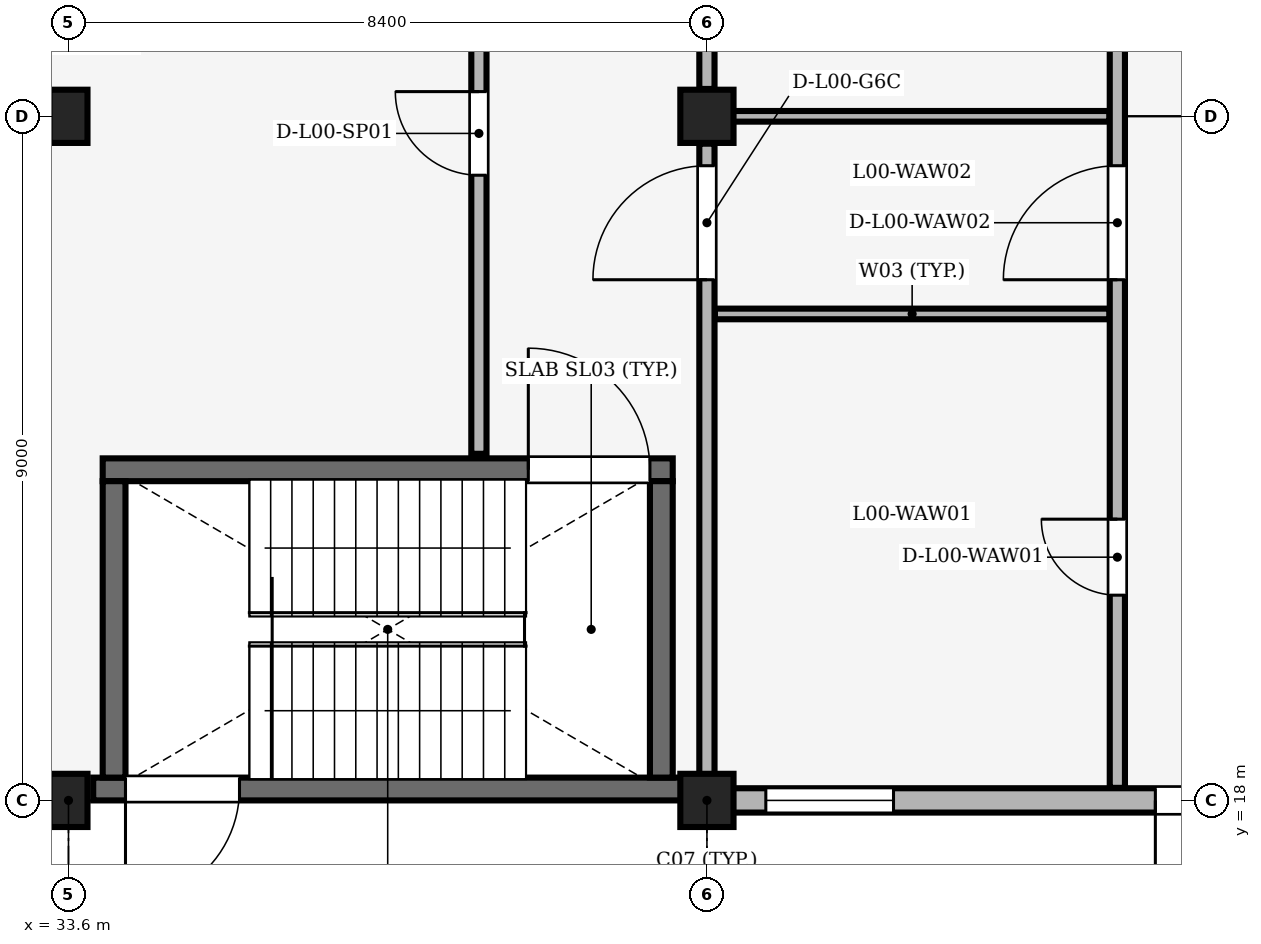
"""IFC4 building model, lengths in metres.
Left out: names, types, materials, properties, quantities, classifications, styles, units other than length and angle.
Written with IfcOpenShell. Run it as: python <this file> out.ifc"""

import sys

from ifc_helpers import new_model, si_unit, direction, frame, frame_2d, origin, origin_2d, place, context, subcontext, project, spatial, rectangle, extrude, element, fill, save


model = new_model("IFC4")
c1 = context("Model", 3, precision=1e-05, world=origin(), true_north=direction((0.0, 1.0)))
c2 = subcontext(c1, "Body", "Model", "MODEL_VIEW")
j1 = project(units=[si_unit("LENGTHUNIT", "METRE"), si_unit("PLANEANGLEUNIT", "RADIAN")], contexts=[c1])
p1 = place(None, origin())
s1 = spatial("IfcSite", under=j1, at=p1, CompositionType="ELEMENT")
p2 = place(p1, origin())
s2 = spatial("IfcBuilding", under=s1, at=p2, CompositionType="ELEMENT")
p3 = place(p2, origin())
s3 = spatial("IfcBuildingStorey", under=s2, at=p3, CompositionType="ELEMENT", Elevation=0.0)
for number, where, z_axis, x_axis in (
    (1, (33.6, 18.0, 0.0), (0.0, 0.0, 1.0), (1.0, 0.0, 0.0)),
    (2, (33.6, 27.0, 0.0), (0.0, 0.0, 1.0), (1.0, 0.0, 0.0)),
):
    element("IfcColumn", number, at=place(p3, frame(where, z_axis=z_axis, x_axis=x_axis)), inside=s3, PredefinedType="COLUMN", context=c2, shape_type="SweptSolid", body=[
        extrude(rectangle(XDim=0.5, YDim=0.7, at=origin_2d()), origin(), (0.0, 0.0, 1.0), 4.8),
    ])
for number, where, z_axis, x_axis in (
    (3, (42.0, 18.0, 0.0), (0.0, 0.0, 1.0), (1.0, 0.0, 0.0)),
    (4, (42.0, 27.0, 0.0), (0.0, 0.0, 1.0), (1.0, 0.0, 0.0)),
):
    element("IfcColumn", number, at=place(p3, frame(where, z_axis=z_axis, x_axis=x_axis)), inside=s3, PredefinedType="COLUMN", context=c2, shape_type="SweptSolid", body=[
        extrude(rectangle(XDim=0.7, YDim=0.7, at=origin_2d()), origin(), (0.0, 0.0, 1.0), 4.8),
    ])
p4 = place(p3, frame((42.325, 18.0, 0.0), z_axis=(0.0, 0.0, 1.0), x_axis=(1.0, 0.0, 0.0)))
e5 = element("IfcWall", 5, at=p4, inside=s3, PredefinedType="SOLIDWALL", context=c2, shape_type="SweptSolid", body=[
    extrude(rectangle(XDim=7.75, YDim=0.32, at=frame_2d((3.875, 0.0))), origin(), (0.0, 0.0, 1.0), 3.73),
])
p5 = place(p4, frame((7.375, 0.0, 0.0), z_axis=(0.0, 0.0, 1.0), x_axis=(-1.0, 0.0, 0.0)))
e6 = element("IfcOpeningElement", 6, at=p5, cuts=e5, PredefinedType="OPENING", context=c2, shape_type="SweptSolid", body=[
    extrude(rectangle(XDim=1.8, YDim=2.35, at=frame_2d((0.9, 1.175))), frame((0.0, 0.17, 0.0), z_axis=(0.0, -1.0, 0.0), x_axis=(1.0, 0.0, 0.0)), (0.0, 0.0, 1.0), 0.34),
])
p6 = place(p4, frame((0.45, 0.0, 0.95)))
e7 = element("IfcOpeningElement", 7, at=p6, cuts=e5, PredefinedType="OPENING", context=c2, shape_type="SweptSolid", body=[
    extrude(rectangle(XDim=1.68, YDim=1.8, at=frame_2d((0.84, 0.9))), frame((0.0, 0.17, 0.0), z_axis=(0.0, -1.0, 0.0), x_axis=(1.0, 0.0, 0.0)), (0.0, 0.0, 1.0), 0.34),
])
p7 = place(p3, frame((33.925, 18.15, 0.0), z_axis=(0.0, 0.0, 1.0), x_axis=(1.0, 0.0, 0.0)))
e8 = element("IfcWall", 8, at=p7, inside=s3, PredefinedType="SHEAR", context=c2, shape_type="SweptSolid", body=[
    extrude(rectangle(XDim=7.75, YDim=0.3, at=frame_2d((3.875, 0.0))), origin(), (0.0, 0.0, 1.0), 4.625),
])
p8 = place(p7, frame((1.925, 0.0, 0.0), z_axis=(0.0, 0.0, 1.0), x_axis=(-1.0, 0.0, 0.0)))
e9 = element("IfcOpeningElement", 9, at=p8, cuts=e8, PredefinedType="OPENING", context=c2, shape_type="SweptSolid", body=[
    extrude(rectangle(XDim=1.5, YDim=2.2, at=frame_2d((0.75, 1.1))), frame((0.0, 0.16, 0.0), z_axis=(0.0, -1.0, 0.0), x_axis=(1.0, 0.0, 0.0)), (0.0, 0.0, 1.0), 0.32),
])
p9 = place(p3, frame((34.05, 22.35, 0.0), z_axis=(0.0, 0.0, 1.0), x_axis=(1.0, 0.0, 0.0)))
e10 = element("IfcWall", 10, at=p9, inside=s3, PredefinedType="SHEAR", context=c2, shape_type="SweptSolid", body=[
    extrude(rectangle(XDim=7.5, YDim=0.3, at=frame_2d((3.75, 0.0))), origin(), (0.0, 0.0, 1.0), 4.625),
])
p10 = place(p9, frame((5.6, 0.0, 0.0)))
e11 = element("IfcOpeningElement", 11, at=p10, cuts=e10, PredefinedType="OPENING", context=c2, shape_type="SweptSolid", body=[
    extrude(rectangle(XDim=1.6, YDim=2.2, at=frame_2d((0.8, 1.1))), frame((0.0, 0.16, 0.0), z_axis=(0.0, -1.0, 0.0), x_axis=(1.0, 0.0, 0.0)), (0.0, 0.0, 1.0), 0.32),
])
for number, where, z_axis, x_axis in (
    (12, (34.2, 18.3, 0.0), (0.0, 0.0, 1.0), (0.0, 1.0, 0.0)),
    (13, (41.4, 18.3, 0.0), (0.0, 0.0, 1.0), (0.0, 1.0, 0.0)),
):
    element("IfcWall", number, at=place(p3, frame(where, z_axis=z_axis, x_axis=x_axis)), inside=s3, PredefinedType="SHEAR", context=c2, shape_type="SweptSolid", body=[
        extrude(rectangle(XDim=3.9, YDim=0.3, at=frame_2d((1.95, 0.0))), origin(), (0.0, 0.0, 1.0), 4.625),
    ])
p11 = place(p3, frame((39.0, 22.56, 0.0), z_axis=(0.0, 0.0, 1.0), x_axis=(0.0, 1.0, 0.0)))
e14 = element("IfcWall", 14, at=p11, inside=s3, PredefinedType="PARTITIONING", context=c2, shape_type="SweptSolid", body=[
    extrude(rectangle(XDim=29.535, YDim=0.2, at=frame_2d((14.768, 0.0))), origin(), (0.0, 0.0, 1.0), 4.5),
])
p12 = place(p11, frame((3.665, 0.0, 0.0)))
e15 = element("IfcOpeningElement", 15, at=p12, cuts=e14, PredefinedType="OPENING", context=c2, shape_type="SweptSolid", body=[
    extrude(rectangle(XDim=1.1, YDim=2.15, at=frame_2d((0.55, 1.075))), frame((0.0, 0.11, 0.0), z_axis=(0.0, -1.0, 0.0), x_axis=(1.0, 0.0, 0.0)), (0.0, 0.0, 1.0), 0.22),
])
p13 = place(p11, frame((12.19, 0.0, 0.0)))
e16 = element("IfcOpeningElement", 16, at=p13, cuts=e14, PredefinedType="OPENING", context=c2, shape_type="SweptSolid", body=[
    extrude(rectangle(XDim=1.1, YDim=2.15, at=frame_2d((0.55, 1.075))), frame((0.0, 0.11, 0.0), z_axis=(0.0, -1.0, 0.0), x_axis=(1.0, 0.0, 0.0)), (0.0, 0.0, 1.0), 0.22),
])
p14 = place(p11, frame((20.04, 0.0, 0.0)))
e17 = element("IfcOpeningElement", 17, at=p14, cuts=e14, PredefinedType="OPENING", context=c2, shape_type="SweptSolid", body=[
    extrude(rectangle(XDim=1.2, YDim=2.2, at=frame_2d((0.6, 1.1))), frame((0.0, 0.11, 0.0), z_axis=(0.0, -1.0, 0.0), x_axis=(1.0, 0.0, 0.0)), (0.0, 0.0, 1.0), 0.22),
])
p15 = place(p11, frame((26.39, 0.0, 0.0)))
e18 = element("IfcOpeningElement", 18, at=p15, cuts=e14, PredefinedType="OPENING", context=c2, shape_type="SweptSolid", body=[
    extrude(rectangle(XDim=1.1, YDim=2.15, at=frame_2d((0.55, 1.075))), frame((0.0, 0.11, 0.0), z_axis=(0.0, -1.0, 0.0), x_axis=(1.0, 0.0, 0.0)), (0.0, 0.0, 1.0), 0.22),
])
p16 = place(p3, frame((42.105, 24.4, 0.0), z_axis=(0.0, 0.0, 1.0), x_axis=(1.0, 0.0, 0.0)))
e19 = element("IfcWall", 19, at=p16, inside=s3, PredefinedType="PARTITIONING", context=c2, shape_type="SweptSolid", body=[
    extrude(rectangle(XDim=5.19, YDim=0.14, at=frame_2d((2.595, 0.0))), origin(), (0.0, 0.0, 1.0), 4.03),
])
p17 = place(p3, frame((42.105, 27.0, 0.0), z_axis=(0.0, 0.0, 1.0), x_axis=(1.0, 0.0, 0.0)))
e20 = element("IfcWall", 20, at=p17, inside=s3, PredefinedType="PARTITIONING", context=c2, shape_type="SweptSolid", body=[
    extrude(rectangle(XDim=5.19, YDim=0.14, at=frame_2d((2.595, 0.0))), origin(), (0.0, 0.0, 1.0), 3.83),
])
p18 = place(p3, frame((47.4, 18.165, 0.0), z_axis=(0.0, 0.0, 1.0), x_axis=(0.0, 1.0, 0.0)))
e21 = element("IfcWall", 21, at=p18, inside=s3, PredefinedType="PARTITIONING", context=c2, shape_type="SweptSolid", body=[
    extrude(rectangle(XDim=67.625, YDim=0.2, at=frame_2d((33.812, 0.0))), origin(), (0.0, 0.0, 1.0), 4.5),
])
p19 = place(p18, frame((2.535, 0.0, 0.0)))
e22 = element("IfcOpeningElement", 22, at=p19, cuts=e21, PredefinedType="OPENING", context=c2, shape_type="SweptSolid", body=[
    extrude(rectangle(XDim=1.0, YDim=2.25, at=frame_2d((0.5, 1.125))), frame((0.0, 0.11, 0.0), z_axis=(0.0, -1.0, 0.0), x_axis=(1.0, 0.0, 0.0)), (0.0, 0.0, 1.0), 0.22),
])
p20 = place(p18, frame((6.685, 0.0, 0.0)))
e23 = element("IfcOpeningElement", 23, at=p20, cuts=e21, PredefinedType="OPENING", context=c2, shape_type="SweptSolid", body=[
    extrude(rectangle(XDim=1.5, YDim=2.2, at=frame_2d((0.75, 1.1))), frame((0.0, 0.11, 0.0), z_axis=(0.0, -1.0, 0.0), x_axis=(1.0, 0.0, 0.0)), (0.0, 0.0, 1.0), 0.22),
])
p21 = place(p18, frame((12.535, 0.0, 0.0)))
e24 = element("IfcOpeningElement", 24, at=p21, cuts=e21, PredefinedType="OPENING", context=c2, shape_type="SweptSolid", body=[
    extrude(rectangle(XDim=1.0, YDim=2.15, at=frame_2d((0.5, 1.075))), frame((0.0, 0.11, 0.0), z_axis=(0.0, -1.0, 0.0), x_axis=(1.0, 0.0, 0.0)), (0.0, 0.0, 1.0), 0.22),
])
p22 = place(p18, frame((20.935, 0.0, 0.0)))
e25 = element("IfcOpeningElement", 25, at=p22, cuts=e21, PredefinedType="OPENING", context=c2, shape_type="SweptSolid", body=[
    extrude(rectangle(XDim=1.0, YDim=2.15, at=frame_2d((0.5, 1.075))), frame((0.0, 0.11, 0.0), z_axis=(0.0, -1.0, 0.0), x_axis=(1.0, 0.0, 0.0)), (0.0, 0.0, 1.0), 0.22),
])
p23 = place(p18, frame((29.36, 0.0, 0.0)))
e26 = element("IfcOpeningElement", 26, at=p23, cuts=e21, PredefinedType="OPENING", context=c2, shape_type="SweptSolid", body=[
    extrude(rectangle(XDim=0.95, YDim=2.2, at=frame_2d((0.475, 1.1))), frame((0.0, 0.11, 0.0), z_axis=(0.0, -1.0, 0.0), x_axis=(1.0, 0.0, 0.0)), (0.0, 0.0, 1.0), 0.22),
])
p24 = place(p18, frame((36.26, 0.0, 0.0)))
e27 = element("IfcOpeningElement", 27, at=p24, cuts=e21, PredefinedType="OPENING", context=c2, shape_type="SweptSolid", body=[
    extrude(rectangle(XDim=0.95, YDim=2.2, at=frame_2d((0.475, 1.1))), frame((0.0, 0.11, 0.0), z_axis=(0.0, -1.0, 0.0), x_axis=(1.0, 0.0, 0.0)), (0.0, 0.0, 1.0), 0.22),
])
p25 = place(p18, frame((41.06, 0.0, 0.0)))
e28 = element("IfcOpeningElement", 28, at=p25, cuts=e21, PredefinedType="OPENING", context=c2, shape_type="SweptSolid", body=[
    extrude(rectangle(XDim=0.95, YDim=2.1, at=frame_2d((0.475, 1.05))), frame((0.0, 0.11, 0.0), z_axis=(0.0, -1.0, 0.0), x_axis=(1.0, 0.0, 0.0)), (0.0, 0.0, 1.0), 0.22),
])
p26 = place(p18, frame((49.635, 0.0, 0.0)))
e29 = element("IfcOpeningElement", 29, at=p26, cuts=e21, PredefinedType="OPENING", context=c2, shape_type="SweptSolid", body=[
    extrude(rectangle(XDim=1.2, YDim=2.2, at=frame_2d((0.6, 1.1))), frame((0.0, 0.11, 0.0), z_axis=(0.0, -1.0, 0.0), x_axis=(1.0, 0.0, 0.0)), (0.0, 0.0, 1.0), 0.22),
])
p27 = place(p18, frame((61.735, 0.0, 0.0)))
e30 = element("IfcOpeningElement", 30, at=p27, cuts=e21, PredefinedType="OPENING", context=c2, shape_type="SweptSolid", body=[
    extrude(rectangle(XDim=1.0, YDim=2.25, at=frame_2d((0.5, 1.125))), frame((0.0, 0.11, 0.0), z_axis=(0.0, -1.0, 0.0), x_axis=(1.0, 0.0, 0.0)), (0.0, 0.0, 1.0), 0.22),
])
p28 = place(p3, frame((42.0, 18.165, 0.0), z_axis=(0.0, 0.0, 1.0), x_axis=(0.0, 1.0, 0.0)))
e31 = element("IfcWall", 31, at=p28, inside=s3, PredefinedType="PARTITIONING", context=c2, shape_type="SweptSolid", body=[
    extrude(rectangle(XDim=8.475, YDim=0.2, at=frame_2d((4.237, 0.0))), origin(), (0.0, 0.0, 1.0), 3.872),
])
p29 = place(p28, frame((6.685, 0.0, 0.0)))
e32 = element("IfcOpeningElement", 32, at=p29, cuts=e31, PredefinedType="OPENING", context=c2, shape_type="SweptSolid", body=[
    extrude(rectangle(XDim=1.5, YDim=2.2, at=frame_2d((0.75, 1.1))), frame((0.0, 0.11, 0.0), z_axis=(0.0, -1.0, 0.0), x_axis=(1.0, 0.0, 0.0)), (0.0, 0.0, 1.0), 0.22),
])
p30 = place(p3, frame((42.0, 27.36, 0.0), z_axis=(0.0, 0.0, 1.0), x_axis=(0.0, 1.0, 0.0)))
e33 = element("IfcWall", 33, at=p30, inside=s3, PredefinedType="PARTITIONING", context=c2, shape_type="SweptSolid", body=[
    extrude(rectangle(XDim=7.68, YDim=0.2, at=frame_2d((3.84, 0.0))), origin(), (0.0, 0.0, 1.0), 3.912),
])
p31 = place(p30, frame((3.34, 0.0, 0.0)))
e34 = element("IfcOpeningElement", 34, at=p31, cuts=e33, PredefinedType="OPENING", context=c2, shape_type="SweptSolid", body=[
    extrude(rectangle(XDim=1.0, YDim=2.15, at=frame_2d((0.5, 1.075))), frame((0.0, 0.11, 0.0), z_axis=(0.0, -1.0, 0.0), x_axis=(1.0, 0.0, 0.0)), (0.0, 0.0, 1.0), 0.22),
])
p32 = place(p5, origin())
e35 = element("IfcDoor", 35, at=p32, inside=s3, OperationType="DOUBLE_DOOR_SINGLE_SWING", PredefinedType="DOOR", context=c2, shape_type="SweptSolid", body=[
    extrude(rectangle(XDim=1.8, YDim=2.35, at=frame_2d((0.9, 1.175))), frame((0.0, 0.025, 0.0), z_axis=(0.0, -1.0, 0.0), x_axis=(1.0, 0.0, 0.0)), (0.0, 0.0, 1.0), 0.05),
])
fill(e6, e35)
p33 = place(p6, origin())
e36 = element("IfcWindow", 36, at=p33, inside=s3, PartitioningType="SINGLE_PANEL", PredefinedType="WINDOW", context=c2, shape_type="SweptSolid", body=[
    extrude(rectangle(XDim=1.68, YDim=1.8, at=frame_2d((0.84, 0.9))), frame((0.0, 0.03, 0.0), z_axis=(0.0, -1.0, 0.0), x_axis=(1.0, 0.0, 0.0)), (0.0, 0.0, 1.0), 0.06),
])
fill(e7, e36)
p34 = place(p8, origin())
e37 = element("IfcDoor", 37, at=p34, inside=s3, OperationType="DOUBLE_DOOR_SINGLE_SWING", PredefinedType="DOOR", context=c2, shape_type="SweptSolid", body=[
    extrude(rectangle(XDim=1.5, YDim=2.2, at=frame_2d((0.75, 1.1))), frame((0.0, 0.025, 0.0), z_axis=(0.0, -1.0, 0.0), x_axis=(1.0, 0.0, 0.0)), (0.0, 0.0, 1.0), 0.05),
])
fill(e9, e37)
p35 = place(p10, origin())
e38 = element("IfcDoor", 38, at=p35, inside=s3, OperationType="DOUBLE_DOOR_SINGLE_SWING", PredefinedType="DOOR", context=c2, shape_type="SweptSolid", body=[
    extrude(rectangle(XDim=1.6, YDim=2.2, at=frame_2d((0.8, 1.1))), frame((0.0, 0.025, 0.0), z_axis=(0.0, -1.0, 0.0), x_axis=(1.0, 0.0, 0.0)), (0.0, 0.0, 1.0), 0.05),
])
fill(e11, e38)
p36 = place(p12, origin())
e39 = element("IfcDoor", 39, at=p36, inside=s3, OperationType="SINGLE_SWING_RIGHT", PredefinedType="DOOR", context=c2, shape_type="SweptSolid", body=[
    extrude(rectangle(XDim=1.1, YDim=2.15, at=frame_2d((0.55, 1.075))), frame((0.0, 0.025, 0.0), z_axis=(0.0, -1.0, 0.0), x_axis=(1.0, 0.0, 0.0)), (0.0, 0.0, 1.0), 0.05),
])
fill(e15, e39)
p37 = place(p19, origin())
e40 = element("IfcDoor", 40, at=p37, inside=s3, OperationType="SINGLE_SWING_RIGHT", PredefinedType="DOOR", context=c2, shape_type="SweptSolid", body=[
    extrude(rectangle(XDim=1.0, YDim=2.25, at=frame_2d((0.5, 1.125))), frame((0.0, 0.025, 0.0), z_axis=(0.0, -1.0, 0.0), x_axis=(1.0, 0.0, 0.0)), (0.0, 0.0, 1.0), 0.05),
])
fill(e22, e40)
p38 = place(p20, origin())
e41 = element("IfcDoor", 41, at=p38, inside=s3, OperationType="DOUBLE_DOOR_SINGLE_SWING", PredefinedType="DOOR", context=c2, shape_type="SweptSolid", body=[
    extrude(rectangle(XDim=1.5, YDim=2.2, at=frame_2d((0.75, 1.1))), frame((0.0, 0.025, 0.0), z_axis=(0.0, -1.0, 0.0), x_axis=(1.0, 0.0, 0.0)), (0.0, 0.0, 1.0), 0.05),
])
fill(e23, e41)
p39 = place(p29, origin())
e42 = element("IfcDoor", 42, at=p39, inside=s3, OperationType="DOUBLE_DOOR_SINGLE_SWING", PredefinedType="DOOR", context=c2, shape_type="SweptSolid", body=[
    extrude(rectangle(XDim=1.5, YDim=2.2, at=frame_2d((0.75, 1.1))), frame((0.0, 0.025, 0.0), z_axis=(0.0, -1.0, 0.0), x_axis=(1.0, 0.0, 0.0)), (0.0, 0.0, 1.0), 0.05),
])
fill(e32, e42)
save(model, sys.argv[1])
